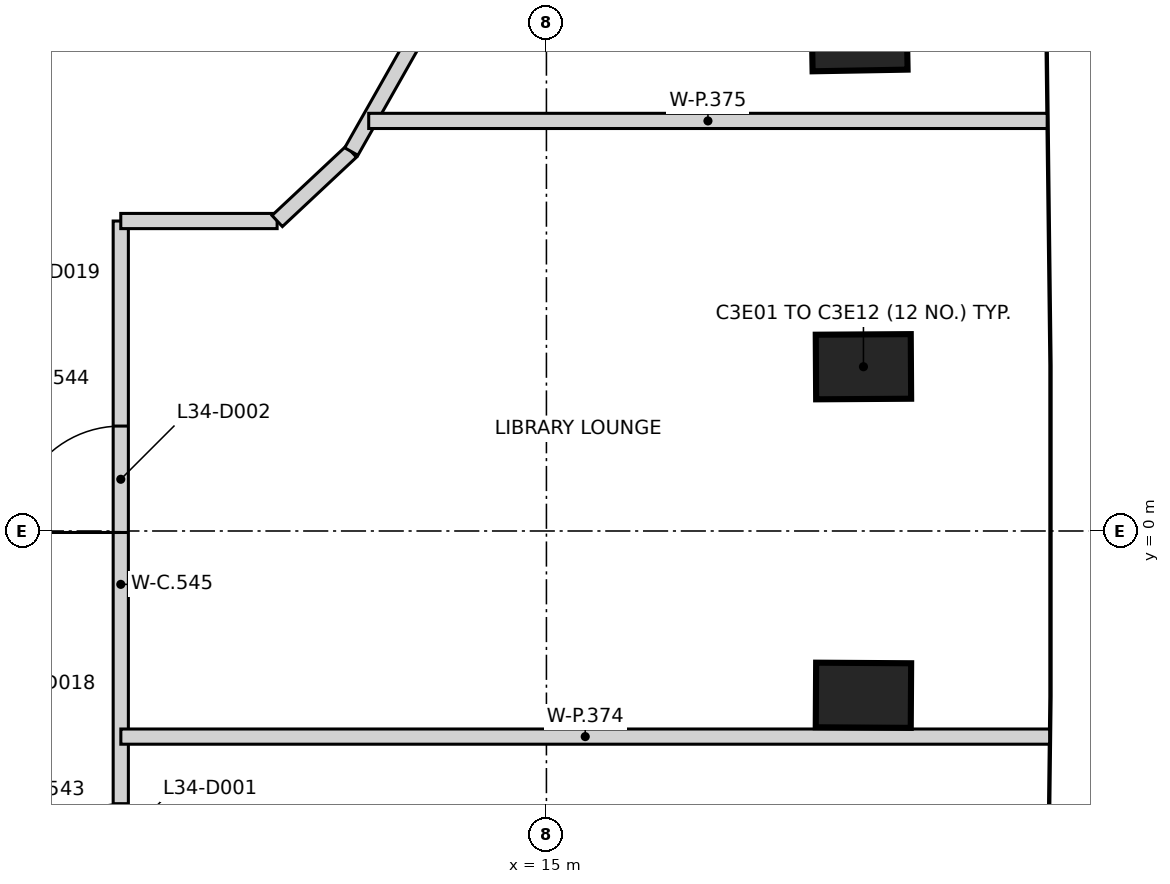
"""IFC4 building model, lengths in metres.
Left out: names, types, materials, properties, quantities, classifications, styles, units other than length and angle.
Written with IfcOpenShell. Run it as: python <this file> out.ifc"""

import sys

from ifc_helpers import new_model, si_unit, direction, frame, frame_2d, origin, origin_2d, place, context, subcontext, project, spatial, rectangle, extrude, element, fill, save


model = new_model("IFC4")
c1 = context("Model", 3, precision=1e-05, world=origin(), true_north=direction((0.0, 1.0)))
c2 = subcontext(c1, "Body", "Model", "MODEL_VIEW")
j1 = project(units=[si_unit("LENGTHUNIT", "METRE"), si_unit("PLANEANGLEUNIT", "RADIAN")], contexts=[c1])
p1 = place(None, origin())
s1 = spatial("IfcSite", under=j1, at=p1, CompositionType="ELEMENT")
p2 = place(p1, origin())
s2 = spatial("IfcBuilding", under=s1, at=p2, CompositionType="ELEMENT")
p3 = place(p2, frame((0.0, 0.0, 139.6)))
s3 = spatial("IfcBuildingStorey", under=s2, at=p3, CompositionType="ELEMENT", Elevation=139.6)
for number, where, z_axis, x_axis in (
    (1, (19.171, -2.161, -0.4), (0.0, 0.0, 1.0), (-1.0, 0.006, 0.0)),
    (2, (19.171, 2.161, -0.4), (0.0, 0.0, 1.0), (1.0, 0.006, 0.0)),
    (3, (19.119, 6.484, -0.4), (0.0, 0.0, 1.0), (1.0, 0.018, 0.0)),
):
    element("IfcColumn", number, at=place(p3, frame(where, z_axis=z_axis, x_axis=x_axis)), inside=s3, PredefinedType="COLUMN", context=c2, shape_type="SweptSolid", body=[
        extrude(rectangle(XDim=1.25, YDim=0.85, at=origin_2d()), origin(), (0.0, 0.0, 1.0), 3.6),
    ])
p4 = place(p3, frame((9.4, -5.482, 0.0), z_axis=(0.0, 0.0, 1.0), x_axis=(0.0, 1.0, 0.0)))
e4 = element("IfcWall", 4, at=p4, inside=s3, PredefinedType="PARTITIONING", context=c2, shape_type="SweptSolid", body=[
    extrude(rectangle(XDim=9.56, YDim=0.2, at=frame_2d((4.78, 0.0))), origin(), (0.0, 0.0, 1.0), 3.2),
])
p5 = place(p4, frame((0.895, 0.0, 0.0)))
e5 = element("IfcOpeningElement", 5, at=p5, cuts=e4, PredefinedType="OPENING", context=c2, shape_type="SweptSolid", body=[
    extrude(rectangle(XDim=1.0, YDim=2.1, at=frame_2d((0.5, 1.05))), frame((0.0, 0.11, 0.0), z_axis=(0.0, -1.0, 0.0), x_axis=(1.0, 0.0, 0.0)), (0.0, 0.0, 1.0), 0.22),
])
p6 = place(p4, frame((5.462, 0.0, 0.0)))
e6 = element("IfcOpeningElement", 6, at=p6, cuts=e4, PredefinedType="OPENING", context=c2, shape_type="SweptSolid", body=[
    extrude(rectangle(XDim=1.4, YDim=2.1, at=frame_2d((0.7, 1.05))), frame((0.0, 0.11, 0.0), z_axis=(0.0, -1.0, 0.0), x_axis=(1.0, 0.0, 0.0)), (0.0, 0.0, 1.0), 0.22),
])
p7 = place(p3, frame((9.4, 4.078, 0.0), z_axis=(0.0, 0.0, 1.0), x_axis=(1.0, 0.0, 0.0)))
e7 = element("IfcWall", 7, at=p7, inside=s3, PredefinedType="PARTITIONING", context=c2, shape_type="SweptSolid", body=[
    extrude(rectangle(XDim=2.057, YDim=0.2, at=frame_2d((1.029, 0.0))), origin(), (0.0, 0.0, 1.0), 3.2),
])
p8 = place(p3, frame((11.458, 4.078, 0.0), z_axis=(0.0, 0.0, 1.0), x_axis=(0.729936032318, 0.683515463412, 0.0)))
e8 = element("IfcWall", 8, at=p8, inside=s3, PredefinedType="PARTITIONING", context=c2, shape_type="SweptSolid", body=[
    extrude(rectangle(XDim=1.336, YDim=0.2, at=frame_2d((0.668, 0.0))), origin(), (0.0, 0.0, 1.0), 3.2),
])
p9 = place(p3, frame((12.433, 4.992, 0.0), z_axis=(0.0, 0.0, 1.0), x_axis=(0.492740203499, 0.870176471675, 0.0)))
e9 = element("IfcWall", 9, at=p9, inside=s3, PredefinedType="PARTITIONING", context=c2, shape_type="SweptSolid", body=[
    extrude(rectangle(XDim=6.265, YDim=0.2, at=frame_2d((3.133, 0.0))), origin(), (0.0, 0.0, 1.0), 3.2),
])
p10 = place(p9, frame((2.858, 0.0, 0.0)))
e10 = element("IfcOpeningElement", 10, at=p10, cuts=e9, PredefinedType="OPENING", context=c2, shape_type="SweptSolid", body=[
    extrude(rectangle(XDim=1.0, YDim=2.1, at=frame_2d((0.5, 1.05))), frame((0.0, 0.11, 0.0), z_axis=(0.0, -1.0, 0.0), x_axis=(1.0, 0.0, 0.0)), (0.0, 0.0, 1.0), 0.22),
])
p11 = place(p3, frame((9.401, -2.705, 0.0), z_axis=(0.0, 0.0, 1.0), x_axis=(1.0, 0.0, 0.0)))
e11 = element("IfcWall", 11, at=p11, inside=s3, PredefinedType="PARTITIONING", context=c2, shape_type="SweptSolid", body=[
    extrude(rectangle(XDim=12.219, YDim=0.2, at=frame_2d((6.11, 0.0))), origin(), (0.0, 0.0, 1.0), 2.3),
])
p12 = place(p3, frame((12.662, 5.395, 0.0), z_axis=(0.0, 0.0, 1.0), x_axis=(1.0, 0.0, 0.0)))
e12 = element("IfcWall", 12, at=p12, inside=s3, PredefinedType="PARTITIONING", context=c2, shape_type="SweptSolid", body=[
    extrude(rectangle(XDim=8.926, YDim=0.2, at=frame_2d((4.463, 0.0))), origin(), (0.0, 0.0, 1.0), 2.3),
])
p13 = place(p5, frame((1.0, 0.0, 0.0), z_axis=(0.0, 0.0, 1.0), x_axis=(-1.0, 0.0, 0.0)))
e13 = element("IfcDoor", 13, at=p13, inside=s3, OperationType="SINGLE_SWING_LEFT", PredefinedType="DOOR", context=c2, shape_type="SweptSolid", body=[
    extrude(rectangle(XDim=1.0, YDim=2.1, at=frame_2d((0.5, 1.05))), frame((0.0, 0.025, 0.0), z_axis=(0.0, -1.0, 0.0), x_axis=(1.0, 0.0, 0.0)), (0.0, 0.0, 1.0), 0.05),
])
fill(e5, e13)
p14 = place(p6, frame((1.4, 0.0, 0.0), z_axis=(0.0, 0.0, 1.0), x_axis=(-1.0, 0.0, 0.0)))
e14 = element("IfcDoor", 14, at=p14, inside=s3, OperationType="DOUBLE_DOOR_SINGLE_SWING", PredefinedType="DOOR", context=c2, shape_type="SweptSolid", body=[
    extrude(rectangle(XDim=1.4, YDim=2.1, at=frame_2d((0.7, 1.05))), frame((0.0, 0.025, 0.0), z_axis=(0.0, -1.0, 0.0), x_axis=(1.0, 0.0, 0.0)), (0.0, 0.0, 1.0), 0.05),
])
fill(e6, e14)
save(model, sys.argv[1])
